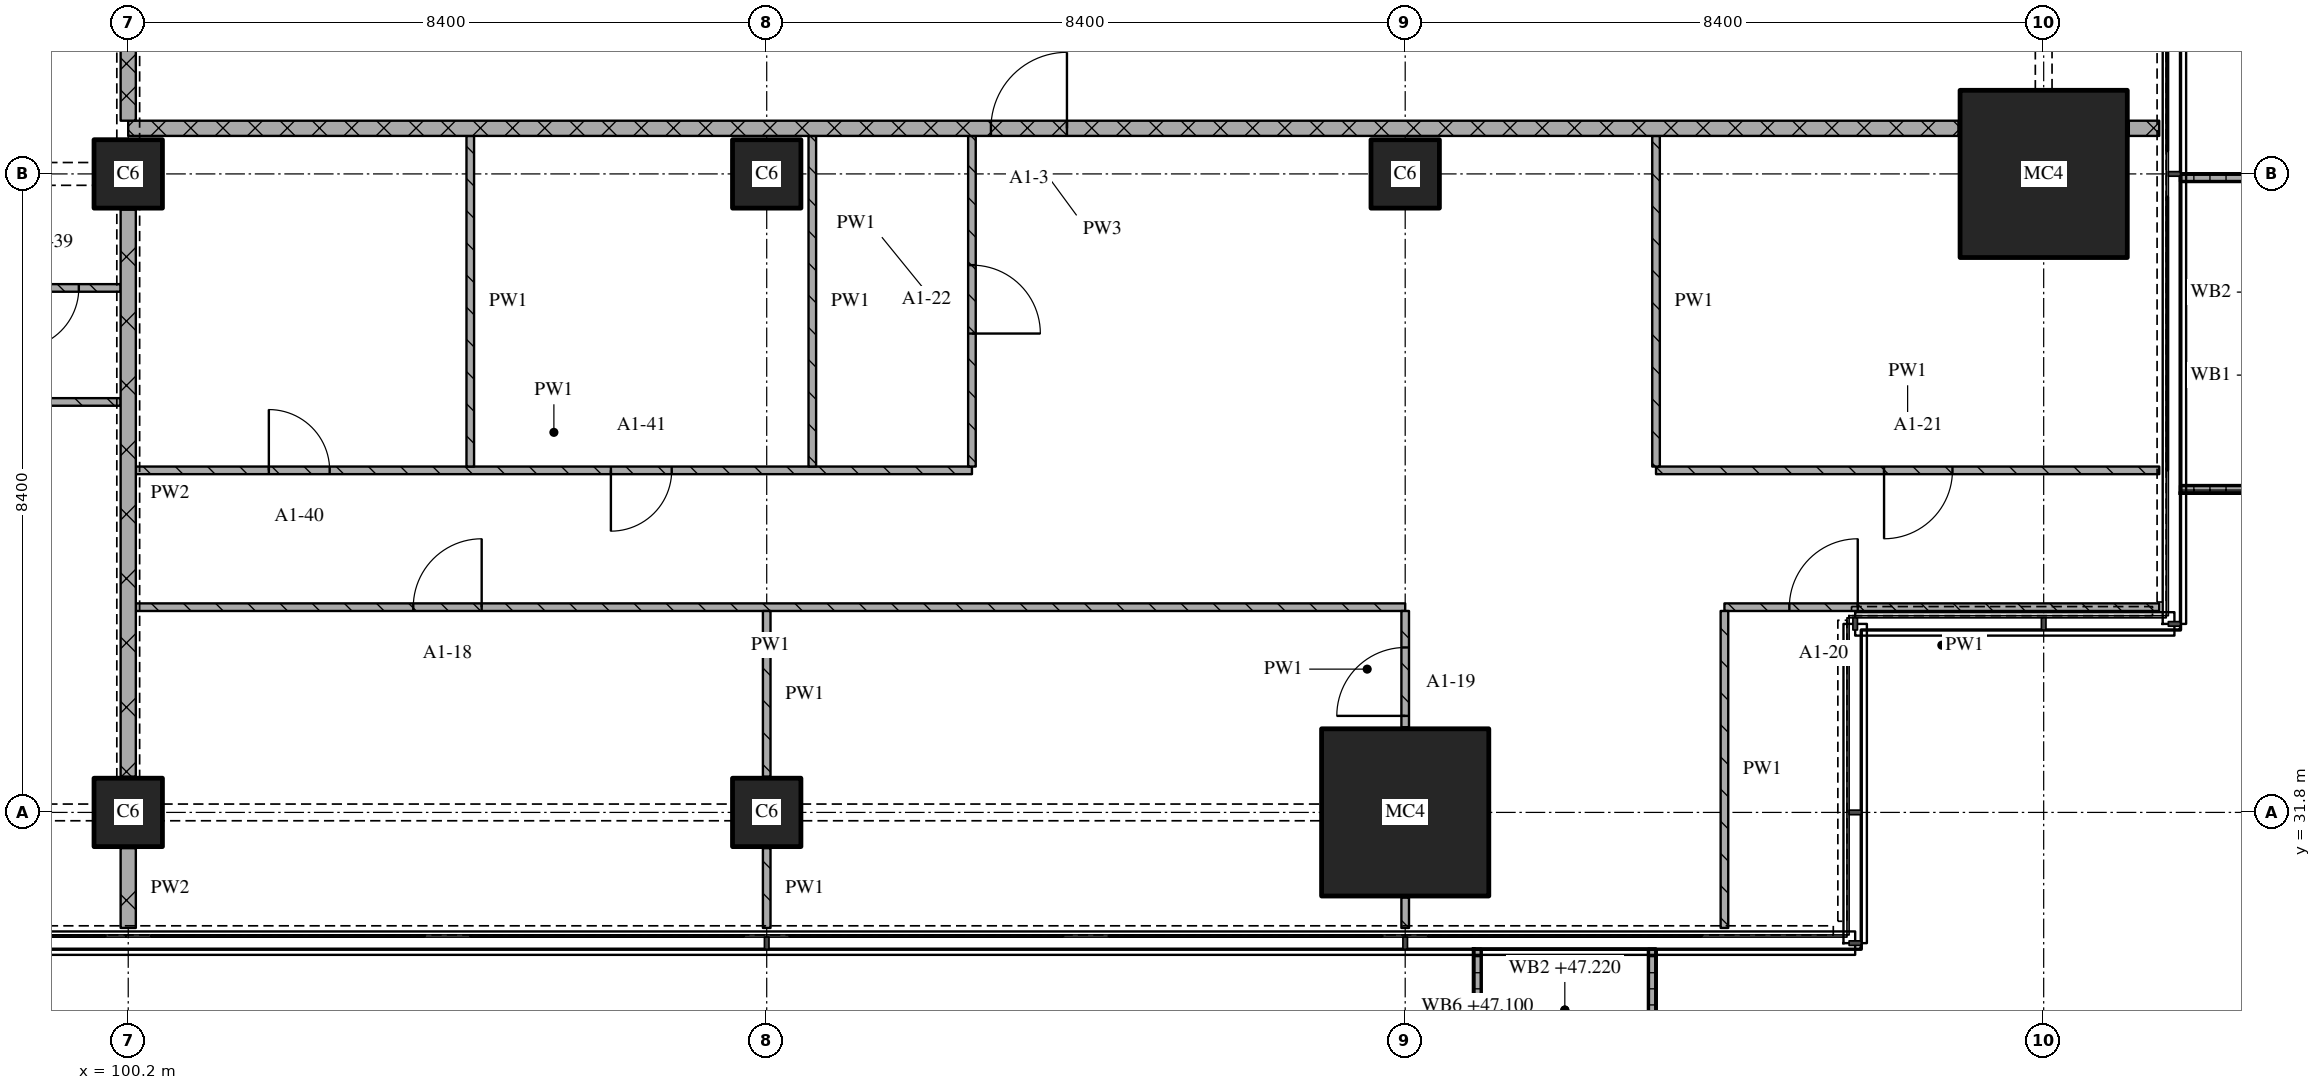
"""IFC4 building model, lengths in metres.
Left out: names, types, materials, properties, quantities, classifications, styles, units other than length and angle.
Written with IfcOpenShell. Run it as: python <this file> out.ifc"""

import sys

from ifc_helpers import new_model, si_unit, direction, frame, frame_2d, origin, origin_2d, place, context, subcontext, project, spatial, polyline, rectangle, outline, extrude, element, fill, save


model = new_model("IFC4")
c1 = context("Model", 3, precision=1e-05, world=origin(), true_north=direction((0.0, 1.0)))
c2 = subcontext(c1, "Body", "Model", "MODEL_VIEW")
j1 = project(units=[si_unit("LENGTHUNIT", "METRE"), si_unit("PLANEANGLEUNIT", "RADIAN")], contexts=[c1])
p1 = place(None, origin())
s1 = spatial("IfcSite", under=j1, at=p1, CompositionType="ELEMENT")
p2 = place(p1, origin())
s2 = spatial("IfcBuilding", under=s1, at=p2, CompositionType="ELEMENT")
p3 = place(p2, frame((0.0, 0.0, 44.4)))
s3 = spatial("IfcBuildingStorey", under=s2, at=p3, CompositionType="ELEMENT", Elevation=44.4)
for number, where, z_axis, x_axis in (
    (1, (100.2, 31.8, 0.0), (0.0, 0.0, 1.0), (1.0, 0.0, 0.0)),
    (2, (100.2, 40.2, 0.0), (0.0, 0.0, 1.0), (1.0, 0.0, 0.0)),
    (3, (108.6, 31.8, 0.0), (0.0, 0.0, 1.0), (1.0, 0.0, 0.0)),
    (4, (108.6, 40.2, 0.0), (0.0, 0.0, 1.0), (1.0, 0.0, 0.0)),
):
    element("IfcColumn", number, at=place(p3, frame(where, z_axis=z_axis, x_axis=x_axis)), inside=s3, PredefinedType="COLUMN", context=c2, shape_type="SweptSolid", body=[
        extrude(rectangle(XDim=0.9, YDim=0.9, at=origin_2d()), origin(), (0.0, 0.0, 1.0), 3.6),
    ])
p4 = place(p3, frame((117.0, 31.8, 0.0), z_axis=(0.0, 0.0, 1.0), x_axis=(1.0, 0.0, 0.0)))
e5 = element("IfcColumn", 5, at=p4, inside=s3, PredefinedType="COLUMN", context=c2, shape_type="SweptSolid", body=[
    extrude(rectangle(XDim=2.2, YDim=2.2, at=origin_2d()), origin(), (0.0, 0.0, 1.0), 3.6),
])
p5 = place(p3, frame((117.0, 40.2, 0.0), z_axis=(0.0, 0.0, 1.0), x_axis=(1.0, 0.0, 0.0)))
e6 = element("IfcColumn", 6, at=p5, inside=s3, PredefinedType="COLUMN", context=c2, shape_type="SweptSolid", body=[
    extrude(rectangle(XDim=0.9, YDim=0.9, at=origin_2d()), origin(), (0.0, 0.0, 1.0), 3.6),
])
p6 = place(p3, frame((125.4, 40.2, 0.0), z_axis=(0.0, 0.0, 1.0), x_axis=(1.0, 0.0, 0.0)))
e7 = element("IfcColumn", 7, at=p6, inside=s3, PredefinedType="COLUMN", context=c2, shape_type="SweptSolid", body=[
    extrude(rectangle(XDim=2.2, YDim=2.2, at=origin_2d()), origin(), (0.0, 0.0, 1.0), 3.6),
])
p7 = place(p3, origin())
e8 = element("IfcWall", 8, at=p7, inside=s3, PredefinedType="SOLIDWALL", context=c2, shape_type="SweptSolid", body=[
    extrude(outline(polyline([(117.9, 30.0), (118.0, 30.0), (118.0, 28.5), (120.2, 28.5), (120.2, 30.0), (120.3, 30.0), (120.3, 28.4), (117.9, 28.4), (117.9, 30.0)])), origin(), (0.0, 0.0, 1.0), 1.0),
])
p8 = place(p3, origin())
e9 = element("IfcWall", 9, at=p8, inside=s3, PredefinedType="SOLIDWALL", context=c2, shape_type="SweptSolid", body=[
    extrude(outline(polyline([(127.2, 36.0), (127.2, 36.1), (128.833, 36.1), (128.833, 40.1), (127.2, 40.1), (127.2, 40.2), (128.933, 40.2), (128.933, 36.0), (127.2, 36.0)])), origin(), (0.0, 0.0, 1.0), 1.0),
])
p9 = place(p3, frame((117.0, 34.5, 0.0), z_axis=(0.0, 0.0, 1.0), x_axis=(-1.0, 0.0, 0.0)))
e10 = element("IfcWall", 10, at=p9, inside=s3, PredefinedType="PARTITIONING", context=c2, shape_type="SweptSolid", body=[
    extrude(rectangle(XDim=16.7, YDim=0.1, at=frame_2d((8.35, 0.0))), origin(), (0.0, 0.0, 1.0), 3.32),
])
p10 = place(p9, frame((12.15, 0.0, 0.0)))
e11 = element("IfcOpeningElement", 11, at=p10, cuts=e10, PredefinedType="OPENING", context=c2, shape_type="SweptSolid", body=[
    extrude(rectangle(XDim=0.9, YDim=2.1, at=frame_2d((0.45, 1.05))), frame((0.0, 0.06, 0.0), z_axis=(0.0, -1.0, 0.0), x_axis=(1.0, 0.0, 0.0)), (0.0, 0.0, 1.0), 0.12),
])
p11 = place(p3, frame((126.92, 34.5, 0.0), z_axis=(0.0, 0.0, 1.0), x_axis=(-1.0, 0.0, 0.0)))
e12 = element("IfcWall", 12, at=p11, inside=s3, PredefinedType="PARTITIONING", context=c2, shape_type="SweptSolid", body=[
    extrude(rectangle(XDim=5.72, YDim=0.1, at=frame_2d((2.86, 0.0))), origin(), (0.0, 0.0, 1.0), 3.32),
])
p12 = place(p11, frame((3.966, 0.0, 0.0)))
e13 = element("IfcOpeningElement", 13, at=p12, cuts=e12, PredefinedType="OPENING", context=c2, shape_type="SweptSolid", body=[
    extrude(rectangle(XDim=0.9, YDim=2.1, at=frame_2d((0.45, 1.05))), frame((0.0, 0.06, 0.0), z_axis=(0.0, -1.0, 0.0), x_axis=(1.0, 0.0, 0.0)), (0.0, 0.0, 1.0), 0.12),
])
p13 = place(p3, frame((100.3, 36.3, 0.0), z_axis=(0.0, 0.0, 1.0), x_axis=(1.0, 0.0, 0.0)))
e14 = element("IfcWall", 14, at=p13, inside=s3, PredefinedType="PARTITIONING", context=c2, shape_type="SweptSolid", body=[
    extrude(rectangle(XDim=11.0, YDim=0.1, at=frame_2d((5.5, 0.0))), origin(), (0.0, 0.0, 1.0), 3.32),
])
p14 = place(p13, frame((1.75, 0.0, 0.0)))
e15 = element("IfcOpeningElement", 15, at=p14, cuts=e14, PredefinedType="OPENING", context=c2, shape_type="SweptSolid", body=[
    extrude(rectangle(XDim=0.8, YDim=2.1, at=frame_2d((0.4, 1.05))), frame((0.0, 0.06, 0.0), z_axis=(0.0, -1.0, 0.0), x_axis=(1.0, 0.0, 0.0)), (0.0, 0.0, 1.0), 0.12),
])
p15 = place(p13, frame((6.25, 0.0, 0.0)))
e16 = element("IfcOpeningElement", 16, at=p15, cuts=e14, PredefinedType="OPENING", context=c2, shape_type="SweptSolid", body=[
    extrude(rectangle(XDim=0.8, YDim=2.1, at=frame_2d((0.4, 1.05))), frame((0.0, 0.06, 0.0), z_axis=(0.0, -1.0, 0.0), x_axis=(1.0, 0.0, 0.0)), (0.0, 0.0, 1.0), 0.12),
])
p16 = place(p3, frame((120.3, 36.3, 0.0), z_axis=(0.0, 0.0, 1.0), x_axis=(1.0, 0.0, 0.0)))
e17 = element("IfcWall", 17, at=p16, inside=s3, PredefinedType="PARTITIONING", context=c2, shape_type="SweptSolid", body=[
    extrude(rectangle(XDim=6.62, YDim=0.1, at=frame_2d((3.31, 0.0))), origin(), (0.0, 0.0, 1.0), 3.32),
])
p17 = place(p16, frame((3.0, 0.0, 0.0)))
e18 = element("IfcOpeningElement", 18, at=p17, cuts=e17, PredefinedType="OPENING", context=c2, shape_type="SweptSolid", body=[
    extrude(rectangle(XDim=0.9, YDim=2.1, at=frame_2d((0.45, 1.05))), frame((0.0, 0.06, 0.0), z_axis=(0.0, -1.0, 0.0), x_axis=(1.0, 0.0, 0.0)), (0.0, 0.0, 1.0), 0.12),
])
p18 = place(p3, frame((100.1, 37.2, 0.0), z_axis=(0.0, 0.0, 1.0), x_axis=(-1.0, 0.0, 0.0)))
e19 = element("IfcWall", 19, at=p18, inside=s3, PredefinedType="PARTITIONING", context=c2, shape_type="SweptSolid", body=[
    extrude(rectangle(XDim=8.3, YDim=0.1, at=frame_2d((4.15, 0.0))), origin(), (0.0, 0.0, 1.0), 3.32),
])
p19 = place(p18, frame((3.65, 0.0, 0.0)))
e20 = element("IfcOpeningElement", 20, at=p19, cuts=e19, PredefinedType="OPENING", context=c2, shape_type="SweptSolid", body=[
    extrude(rectangle(XDim=0.9, YDim=2.1, at=frame_2d((0.45, 1.05))), frame((0.0, 0.06, 0.0), z_axis=(0.0, -1.0, 0.0), x_axis=(1.0, 0.0, 0.0)), (0.0, 0.0, 1.0), 0.12),
])
p20 = place(p3, frame((93.9, 38.7, 0.0), z_axis=(0.0, 0.0, 1.0), x_axis=(1.0, 0.0, 0.0)))
e21 = element("IfcWall", 21, at=p20, inside=s3, PredefinedType="PARTITIONING", context=c2, shape_type="SweptSolid", body=[
    extrude(rectangle(XDim=6.2, YDim=0.1, at=frame_2d((3.1, 0.0))), origin(), (0.0, 0.0, 1.0), 3.32),
])
p21 = place(p20, frame((4.85, 0.0, 0.0)))
e22 = element("IfcOpeningElement", 22, at=p21, cuts=e21, PredefinedType="OPENING", context=c2, shape_type="SweptSolid", body=[
    extrude(rectangle(XDim=0.8, YDim=2.1, at=frame_2d((0.4, 1.05))), frame((0.0, 0.06, 0.0), z_axis=(0.0, -1.0, 0.0), x_axis=(1.0, 0.0, 0.0)), (0.0, 0.0, 1.0), 0.12),
])
p22 = place(p3, frame((124.28, 40.8, 0.0), z_axis=(0.0, 0.0, 1.0), x_axis=(-1.0, 0.0, 0.0)))
e23 = element("IfcWall", 23, at=p22, inside=s3, PredefinedType="PARTITIONING", context=c2, shape_type="SweptSolid", body=[
    extrude(rectangle(XDim=24.08, YDim=0.2, at=frame_2d((12.04, 0.0))), origin(), (0.0, 0.0, 1.0), 3.32),
])
p23 = place(p22, frame((11.73, 0.0, 0.0)))
e24 = element("IfcOpeningElement", 24, at=p23, cuts=e23, PredefinedType="OPENING", context=c2, shape_type="SweptSolid", body=[
    extrude(rectangle(XDim=1.0, YDim=2.1, at=frame_2d((0.5, 1.05))), frame((0.0, 0.11, 0.0), z_axis=(0.0, -1.0, 0.0), x_axis=(1.0, 0.0, 0.0)), (0.0, 0.0, 1.0), 0.22),
])
p24 = place(p3, frame((126.52, 40.8, 0.0), z_axis=(0.0, 0.0, 1.0), x_axis=(1.0, 0.0, 0.0)))
e25 = element("IfcWall", 25, at=p24, inside=s3, PredefinedType="PARTITIONING", context=c2, shape_type="SweptSolid", body=[
    extrude(rectangle(XDim=0.4, YDim=0.2, at=frame_2d((0.2, 0.0))), origin(), (0.0, 0.0, 1.0), 3.32),
])
p25 = place(p3, frame((100.2, 43.1, 0.0), z_axis=(0.0, 0.0, 1.0), x_axis=(0.0, -1.0, 0.0)))
e26 = element("IfcWall", 26, at=p25, inside=s3, PredefinedType="PARTITIONING", context=c2, shape_type="SweptSolid", body=[
    extrude(rectangle(XDim=2.2, YDim=0.2, at=frame_2d((1.1, 0.0))), origin(), (0.0, 0.0, 1.0), 2.43),
])
p26 = place(p3, frame((100.2, 31.33, 0.0), z_axis=(0.0, 0.0, 1.0), x_axis=(0.0, -1.0, 0.0)))
e27 = element("IfcWall", 27, at=p26, inside=s3, PredefinedType="PARTITIONING", context=c2, shape_type="SweptSolid", body=[
    extrude(rectangle(XDim=1.05, YDim=0.2, at=frame_2d((0.525, 0.0))), origin(), (0.0, 0.0, 1.0), 3.32),
])
p27 = place(p3, frame((100.2, 39.73, 0.0), z_axis=(0.0, 0.0, 1.0), x_axis=(0.0, -1.0, 0.0)))
e28 = element("IfcWall", 28, at=p27, inside=s3, PredefinedType="PARTITIONING", context=c2, shape_type="SweptSolid", body=[
    extrude(rectangle(XDim=7.46, YDim=0.2, at=frame_2d((3.73, 0.0))), origin(), (0.0, 0.0, 1.0), 2.83),
])
p28 = place(p3, frame((104.7, 40.7, 0.0), z_axis=(0.0, 0.0, 1.0), x_axis=(0.0, -1.0, 0.0)))
e29 = element("IfcWall", 29, at=p28, inside=s3, PredefinedType="PARTITIONING", context=c2, shape_type="SweptSolid", body=[
    extrude(rectangle(XDim=4.35, YDim=0.1, at=frame_2d((2.175, 0.0))), origin(), (0.0, 0.0, 1.0), 3.32),
])
p29 = place(p3, frame((108.6, 31.33, 0.0), z_axis=(0.0, 0.0, 1.0), x_axis=(0.0, -1.0, 0.0)))
e30 = element("IfcWall", 30, at=p29, inside=s3, PredefinedType="PARTITIONING", context=c2, shape_type="SweptSolid", body=[
    extrude(rectangle(XDim=1.05, YDim=0.1, at=frame_2d((0.525, 0.0))), origin(), (0.0, 0.0, 1.0), 3.32),
])
p30 = place(p3, frame((108.6, 34.45, 0.0), z_axis=(0.0, 0.0, 1.0), x_axis=(0.0, -1.0, 0.0)))
e31 = element("IfcWall", 31, at=p30, inside=s3, PredefinedType="PARTITIONING", context=c2, shape_type="SweptSolid", body=[
    extrude(rectangle(XDim=2.18, YDim=0.1, at=frame_2d((1.09, 0.0))), origin(), (0.0, 0.0, 1.0), 3.32),
])
p31 = place(p3, frame((109.2, 40.7, 0.0), z_axis=(0.0, 0.0, 1.0), x_axis=(0.0, -1.0, 0.0)))
e32 = element("IfcWall", 32, at=p31, inside=s3, PredefinedType="PARTITIONING", context=c2, shape_type="SweptSolid", body=[
    extrude(rectangle(XDim=4.35, YDim=0.1, at=frame_2d((2.175, 0.0))), origin(), (0.0, 0.0, 1.0), 3.32),
])
p32 = place(p3, frame((111.3, 36.35, 0.0), z_axis=(0.0, 0.0, 1.0), x_axis=(0.0, 1.0, 0.0)))
e33 = element("IfcWall", 33, at=p32, inside=s3, PredefinedType="PARTITIONING", context=c2, shape_type="SweptSolid", body=[
    extrude(rectangle(XDim=4.35, YDim=0.1, at=frame_2d((2.175, 0.0))), origin(), (0.0, 0.0, 1.0), 3.32),
])
p33 = place(p32, frame((1.75, 0.0, 0.0)))
e34 = element("IfcOpeningElement", 34, at=p33, cuts=e33, PredefinedType="OPENING", context=c2, shape_type="SweptSolid", body=[
    extrude(rectangle(XDim=0.9, YDim=2.1, at=frame_2d((0.45, 1.05))), frame((0.0, 0.06, 0.0), z_axis=(0.0, -1.0, 0.0), x_axis=(1.0, 0.0, 0.0)), (0.0, 0.0, 1.0), 0.12),
])
p34 = place(p3, frame((117.0, 30.68, 0.0), z_axis=(0.0, 0.0, 1.0), x_axis=(0.0, -1.0, 0.0)))
e35 = element("IfcWall", 35, at=p34, inside=s3, PredefinedType="PARTITIONING", context=c2, shape_type="SweptSolid", body=[
    extrude(rectangle(XDim=0.4, YDim=0.1, at=frame_2d((0.2, 0.0))), origin(), (0.0, 0.0, 1.0), 3.32),
])
p35 = place(p3, frame((117.0, 32.92, 0.0), z_axis=(0.0, 0.0, 1.0), x_axis=(0.0, 1.0, 0.0)))
e36 = element("IfcWall", 36, at=p35, inside=s3, PredefinedType="PARTITIONING", context=c2, shape_type="SweptSolid", body=[
    extrude(rectangle(XDim=1.53, YDim=0.1, at=frame_2d((0.765, 0.0))), origin(), (0.0, 0.0, 1.0), 3.32),
])
p36 = place(p35, frame((0.15, 0.0, 0.0)))
e37 = element("IfcOpeningElement", 37, at=p36, cuts=e36, PredefinedType="OPENING", context=c2, shape_type="SweptSolid", body=[
    extrude(rectangle(XDim=0.9, YDim=2.1, at=frame_2d((0.45, 1.05))), frame((0.0, 0.06, 0.0), z_axis=(0.0, -1.0, 0.0), x_axis=(1.0, 0.0, 0.0)), (0.0, 0.0, 1.0), 0.12),
])
p37 = place(p3, frame((120.3, 40.7, 0.0), z_axis=(0.0, 0.0, 1.0), x_axis=(0.0, -1.0, 0.0)))
e38 = element("IfcWall", 38, at=p37, inside=s3, PredefinedType="PARTITIONING", context=c2, shape_type="SweptSolid", body=[
    extrude(rectangle(XDim=4.35, YDim=0.1, at=frame_2d((2.175, 0.0))), origin(), (0.0, 0.0, 1.0), 3.32),
])
p38 = place(p3, frame((121.2, 34.45, 0.0), z_axis=(0.0, 0.0, 1.0), x_axis=(0.0, -1.0, 0.0)))
e39 = element("IfcWall", 39, at=p38, inside=s3, PredefinedType="PARTITIONING", context=c2, shape_type="SweptSolid", body=[
    extrude(rectangle(XDim=4.17, YDim=0.1, at=frame_2d((2.085, 0.0))), origin(), (0.0, 0.0, 1.0), 3.32),
])
p39 = place(p10, origin())
e40 = element("IfcDoor", 40, at=p39, inside=s3, OperationType="SINGLE_SWING_RIGHT", PredefinedType="DOOR", context=c2, shape_type="SweptSolid", body=[
    extrude(rectangle(XDim=0.9, YDim=2.1, at=frame_2d((0.45, 1.05))), frame((0.0, 0.025, 0.0), z_axis=(0.0, -1.0, 0.0), x_axis=(1.0, 0.0, 0.0)), (0.0, 0.0, 1.0), 0.05),
])
fill(e11, e40)
p40 = place(p12, origin())
e41 = element("IfcDoor", 41, at=p40, inside=s3, OperationType="SINGLE_SWING_RIGHT", PredefinedType="DOOR", context=c2, shape_type="SweptSolid", body=[
    extrude(rectangle(XDim=0.9, YDim=2.1, at=frame_2d((0.45, 1.05))), frame((0.0, 0.025, 0.0), z_axis=(0.0, -1.0, 0.0), x_axis=(1.0, 0.0, 0.0)), (0.0, 0.0, 1.0), 0.05),
])
fill(e13, e41)
p41 = place(p14, origin())
e42 = element("IfcDoor", 42, at=p41, inside=s3, OperationType="SINGLE_SWING_LEFT", PredefinedType="DOOR", context=c2, shape_type="SweptSolid", body=[
    extrude(rectangle(XDim=0.8, YDim=2.1, at=frame_2d((0.4, 1.05))), frame((0.0, 0.025, 0.0), z_axis=(0.0, -1.0, 0.0), x_axis=(1.0, 0.0, 0.0)), (0.0, 0.0, 1.0), 0.05),
])
fill(e15, e42)
p42 = place(p15, origin())
e43 = element("IfcDoor", 43, at=p42, inside=s3, OperationType="SINGLE_SWING_RIGHT", PredefinedType="DOOR", context=c2, shape_type="SweptSolid", body=[
    extrude(rectangle(XDim=0.8, YDim=2.1, at=frame_2d((0.4, 1.05))), frame((0.0, 0.025, 0.0), z_axis=(0.0, -1.0, 0.0), x_axis=(1.0, 0.0, 0.0)), (0.0, 0.0, 1.0), 0.05),
])
fill(e16, e43)
p43 = place(p17, origin())
e44 = element("IfcDoor", 44, at=p43, inside=s3, OperationType="SINGLE_SWING_RIGHT", PredefinedType="DOOR", context=c2, shape_type="SweptSolid", body=[
    extrude(rectangle(XDim=0.9, YDim=2.1, at=frame_2d((0.45, 1.05))), frame((0.0, 0.025, 0.0), z_axis=(0.0, -1.0, 0.0), x_axis=(1.0, 0.0, 0.0)), (0.0, 0.0, 1.0), 0.05),
])
fill(e18, e44)
p44 = place(p21, origin())
e45 = element("IfcDoor", 45, at=p44, inside=s3, OperationType="SINGLE_SWING_RIGHT", PredefinedType="DOOR", context=c2, shape_type="SweptSolid", body=[
    extrude(rectangle(XDim=0.8, YDim=2.1, at=frame_2d((0.4, 1.05))), frame((0.0, 0.025, 0.0), z_axis=(0.0, -1.0, 0.0), x_axis=(1.0, 0.0, 0.0)), (0.0, 0.0, 1.0), 0.05),
])
fill(e22, e45)
p45 = place(p23, origin())
e46 = element("IfcDoor", 46, at=p45, inside=s3, OperationType="SINGLE_SWING_RIGHT", PredefinedType="DOOR", context=c2, shape_type="SweptSolid", body=[
    extrude(rectangle(XDim=1.0, YDim=2.1, at=frame_2d((0.5, 1.05))), frame((0.0, 0.025, 0.0), z_axis=(0.0, -1.0, 0.0), x_axis=(1.0, 0.0, 0.0)), (0.0, 0.0, 1.0), 0.05),
])
fill(e24, e46)
p46 = place(p33, origin())
e47 = element("IfcDoor", 47, at=p46, inside=s3, OperationType="SINGLE_SWING_RIGHT", PredefinedType="DOOR", context=c2, shape_type="SweptSolid", body=[
    extrude(rectangle(XDim=0.9, YDim=2.1, at=frame_2d((0.45, 1.05))), frame((0.0, 0.025, 0.0), z_axis=(0.0, -1.0, 0.0), x_axis=(1.0, 0.0, 0.0)), (0.0, 0.0, 1.0), 0.05),
])
fill(e34, e47)
p47 = place(p36, origin())
e48 = element("IfcDoor", 48, at=p47, inside=s3, OperationType="SINGLE_SWING_LEFT", PredefinedType="DOOR", context=c2, shape_type="SweptSolid", body=[
    extrude(rectangle(XDim=0.9, YDim=2.1, at=frame_2d((0.45, 1.05))), frame((0.0, 0.025, 0.0), z_axis=(0.0, -1.0, 0.0), x_axis=(1.0, 0.0, 0.0)), (0.0, 0.0, 1.0), 0.05),
])
fill(e37, e48)
save(model, sys.argv[1])
